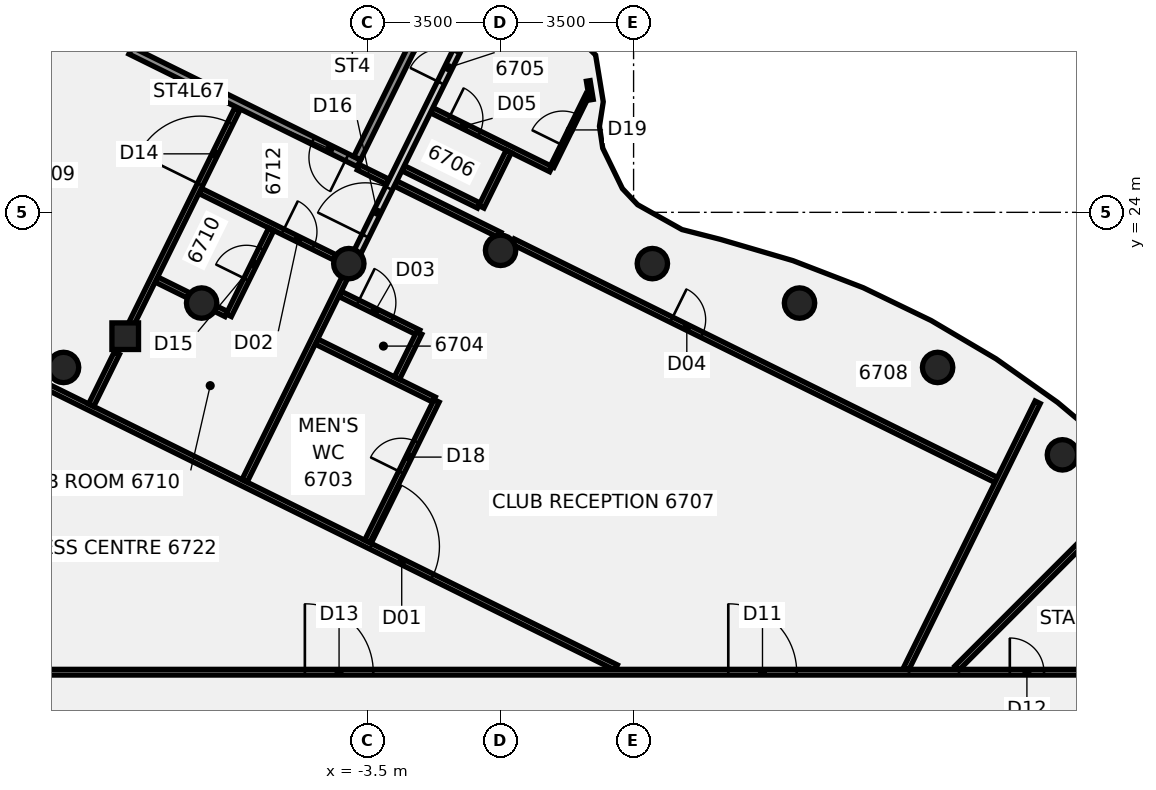
"""IFC4 building model, lengths in metres.
Left out: names, types, materials, properties, quantities, classifications, styles, units other than length and angle.
Written with IfcOpenShell. Run it as: python <this file> out.ifc"""

import sys

from ifc_helpers import new_model, si_unit, direction, frame, frame_2d, origin, origin_2d, place, context, subcontext, project, spatial, rectangle, circle, extrude, element, fill, save


model = new_model("IFC4")
c1 = context("Model", 3, precision=1e-05, world=origin(), true_north=direction((0.0, 1.0)))
c2 = subcontext(c1, "Body", "Model", "MODEL_VIEW")
j1 = project(units=[si_unit("LENGTHUNIT", "METRE"), si_unit("PLANEANGLEUNIT", "RADIAN")], contexts=[c1])
p1 = place(None, origin())
s1 = spatial("IfcSite", under=j1, at=p1, CompositionType="ELEMENT")
p2 = place(p1, origin())
s2 = spatial("IfcBuilding", under=s1, at=p2, CompositionType="ELEMENT")
p3 = place(p2, frame((0.0, 0.0, 264.0)))
s3 = spatial("IfcBuildingStorey", under=s2, at=p3, CompositionType="ELEMENT", Elevation=264.0)
for number, where, z_axis, x_axis in (
    (1, (14.784, 17.619, -0.14), (0.0, 0.0, 1.0), (1.0, 0.0, 0.0)),
    (2, (11.5, 19.919, -0.14), (0.0, 0.0, 1.0), (1.0, 0.0, 0.0)),
    (3, (7.866, 21.613, -0.14), (0.0, 0.0, 1.0), (1.0, 0.0, 0.0)),
    (4, (3.994, 22.651, -0.14), (0.0, 0.0, 1.0), (1.0, 0.0, 0.0)),
    (5, (0.0, 23.0, -0.14), (0.0, 0.0, 1.0), (1.0, 0.0, 0.0)),
    (6, (-3.994, 22.651, -0.14), (0.0, 0.0, 1.0), (1.0, 0.0, 0.0)),
    (7, (-7.866, 21.613, -0.14), (0.0, 0.0, 1.0), (1.0, 0.0, 0.0)),
    (8, (-11.5, 19.919, -0.14), (0.0, 0.0, 1.0), (1.0, 0.0, 0.0)),
):
    element("IfcColumn", number, at=place(p3, frame(where, z_axis=z_axis, x_axis=x_axis)), inside=s3, PredefinedType="COLUMN", context=c2, shape_type="SweptSolid", body=[
        extrude(circle(Radius=0.4, at=origin_2d()), origin(), (0.0, 0.0, 1.0), 3.6),
    ])
p4 = place(p3, frame((-9.877, 20.741, -0.139), z_axis=(0.006777933843, -0.049953372425, 0.998728551808), x_axis=(0.44361754105, 0.895242437735, 0.041766672718)))
e9 = element("IfcColumn", 9, at=p4, inside=s3, PredefinedType="COLUMN", context=c2, shape_type="SweptSolid", body=[
    extrude(rectangle(XDim=0.7, YDim=0.7, at=origin_2d()), origin(), (0.0, 0.0, 1.0), 3.602),
])
p5 = place(p3, frame((-15.346, 21.099, 0.0), z_axis=(0.0, 0.0, 1.0), x_axis=(0.896736901725, -0.442564039529, 0.0)))
e10 = element("IfcWall", 10, at=p5, inside=s3, PredefinedType="PARTITIONING", context=c2, shape_type="SweptSolid", body=[
    extrude(rectangle(XDim=20.505, YDim=0.15, at=frame_2d((10.252, 0.0))), origin(), (0.0, 0.0, 1.0), 2.864),
])
p6 = place(p5, frame((13.313, 0.0, 0.0)))
e11 = element("IfcOpeningElement", 11, at=p6, cuts=e10, PredefinedType="OPENING", context=c2, shape_type="SweptSolid", body=[
    extrude(rectangle(XDim=1.8, YDim=2.1, at=frame_2d((0.9, 1.05))), frame((0.0, 0.085, 0.0), z_axis=(0.0, -1.0, 0.0), x_axis=(1.0, 0.0, 0.0)), (0.0, 0.0, 1.0), 0.17),
])
p7 = place(p3, frame((-9.058, 22.233, 0.0), z_axis=(0.0, 0.0, 1.0), x_axis=(0.896612194763, -0.442816634965, 0.0)))
e12 = element("IfcWall", 12, at=p7, inside=s3, PredefinedType="PARTITIONING", context=c2, shape_type="SweptSolid", body=[
    extrude(rectangle(XDim=0.934, YDim=0.15, at=frame_2d((0.467, 0.0))), origin(), (0.0, 0.0, 1.0), 2.864),
])
p8 = place(p3, frame((-7.497, 21.462, 0.0), z_axis=(0.0, 0.0, 1.0), x_axis=(0.896780848016, -0.442474983058, 0.0)))
e13 = element("IfcWall", 13, at=p8, inside=s3, PredefinedType="PARTITIONING", context=c2, shape_type="SweptSolid", body=[
    extrude(rectangle(XDim=0.31, YDim=0.15, at=frame_2d((0.155, 0.0))), origin(), (0.0, 0.0, 1.0), 2.864),
])
p9 = place(p3, frame((-7.907, 24.564, 0.0), z_axis=(0.0, 0.0, 1.0), x_axis=(0.896882946965, -0.442267995048, 0.0)))
e14 = element("IfcWall", 14, at=p9, inside=s3, PredefinedType="PARTITIONING", context=c2, shape_type="SweptSolid", body=[
    extrude(rectangle(XDim=3.955, YDim=0.15, at=frame_2d((1.977, 0.0))), origin(), (0.0, 0.0, 1.0), 2.864),
])
p10 = place(p9, frame((2.425, 0.0, 0.0)))
e15 = element("IfcOpeningElement", 15, at=p10, cuts=e14, PredefinedType="OPENING", context=c2, shape_type="SweptSolid", body=[
    extrude(rectangle(XDim=0.9, YDim=2.1, at=frame_2d((0.45, 1.05))), frame((0.0, 0.085, 0.0), z_axis=(0.0, -1.0, 0.0), x_axis=(1.0, 0.0, 0.0)), (0.0, 0.0, 1.0), 0.17),
])
p11 = place(p3, frame((-4.845, 20.6, 0.0), z_axis=(0.0, 0.0, 1.0), x_axis=(0.896750466417, -0.442536553272, 0.0)))
e16 = element("IfcWall", 16, at=p11, inside=s3, PredefinedType="PARTITIONING", context=c2, shape_type="SweptSolid", body=[
    extrude(rectangle(XDim=3.45, YDim=0.15, at=frame_2d((1.725, 0.0))), origin(), (0.0, 0.0, 1.0), 2.864),
])
p12 = place(p3, frame((-4.221, 21.853, 0.0), z_axis=(0.0, 0.0, 1.0), x_axis=(0.896771622249, -0.442493680778, 0.0)))
e17 = element("IfcWall", 17, at=p12, inside=s3, PredefinedType="PARTITIONING", context=c2, shape_type="SweptSolid", body=[
    extrude(rectangle(XDim=2.3, YDim=0.15, at=frame_2d((1.15, 0.0))), origin(), (0.0, 0.0, 1.0), 2.864),
])
p13 = place(p12, frame((0.52, 0.0, 0.0)))
e18 = element("IfcOpeningElement", 18, at=p13, cuts=e17, PredefinedType="OPENING", context=c2, shape_type="SweptSolid", body=[
    extrude(rectangle(XDim=1.0, YDim=2.1, at=frame_2d((0.5, 1.05))), frame((0.0, 0.085, 0.0), z_axis=(0.0, -1.0, 0.0), x_axis=(1.0, 0.0, 0.0)), (0.0, 0.0, 1.0), 0.17),
])
p14 = place(p3, frame((-3.738, 25.183, 0.0), z_axis=(0.0, 0.0, 1.0), x_axis=(0.896799875453, -0.442436417339, 0.0)))
e19 = element("IfcWall", 19, at=p14, inside=s3, PredefinedType="PARTITIONING", context=c2, shape_type="SweptSolid", body=[
    extrude(rectangle(XDim=0.86, YDim=0.15, at=frame_2d((0.43, 0.0))), origin(), (0.0, 0.0, 1.0), 2.864),
])
p15 = place(p3, frame((-2.764, 24.759, 0.0), z_axis=(0.0, 0.0, 1.0), x_axis=(0.896729050062, -0.442579948456, 0.0)))
e20 = element("IfcWall", 20, at=p15, inside=s3, PredefinedType="PARTITIONING", context=c2, shape_type="SweptSolid", body=[
    extrude(rectangle(XDim=3.06, YDim=0.15, at=frame_2d((1.53, 0.0))), origin(), (0.0, 0.0, 1.0), 2.864),
])
p16 = place(p3, frame((0.327, 23.233, 0.0), z_axis=(0.0, 0.0, 1.0), x_axis=(0.896732994019, -0.442571957355, 0.0)))
e21 = element("IfcWall", 21, at=p16, inside=s3, PredefinedType="PARTITIONING", context=c2, shape_type="SweptSolid", body=[
    extrude(rectangle(XDim=14.178, YDim=0.15, at=frame_2d((7.089, 0.0))), origin(), (0.0, 0.0, 1.0), 2.864),
])
p17 = place(p16, frame((4.65, 0.0, 0.0)))
e22 = element("IfcOpeningElement", 22, at=p17, cuts=e21, PredefinedType="OPENING", context=c2, shape_type="SweptSolid", body=[
    extrude(rectangle(XDim=0.9, YDim=2.1, at=frame_2d((0.45, 1.05))), frame((0.0, 0.085, 0.0), z_axis=(0.0, -1.0, 0.0), x_axis=(1.0, 0.0, 0.0)), (0.0, 0.0, 1.0), 0.17),
])
p18 = place(p3, frame((-2.565, 25.162, 0.0), z_axis=(0.0, 0.0, 1.0), x_axis=(0.896768640795, -0.442499723037, 0.0)))
e23 = element("IfcWall", 23, at=p18, inside=s3, PredefinedType="PARTITIONING", context=c2, shape_type="SweptSolid", body=[
    extrude(rectangle(XDim=2.22, YDim=0.15, at=frame_2d((1.11, 0.0))), origin(), (0.0, 0.0, 1.0), 2.864),
])
p19 = place(p3, frame((-1.809, 26.685, 0.0), z_axis=(0.0, 0.0, 1.0), x_axis=(0.896582193995, -0.44287737514, 0.0)))
e24 = element("IfcWall", 24, at=p19, inside=s3, PredefinedType="PARTITIONING", context=c2, shape_type="SweptSolid", body=[
    extrude(rectangle(XDim=3.495, YDim=0.15, at=frame_2d((1.748, 0.0))), origin(), (0.0, 0.0, 1.0), 2.864),
])
p20 = place(p19, frame((0.495, 0.0, 0.0)))
e25 = element("IfcOpeningElement", 25, at=p20, cuts=e24, PredefinedType="OPENING", context=c2, shape_type="SweptSolid", body=[
    extrude(rectangle(XDim=0.9, YDim=2.1, at=frame_2d((0.45, 1.05))), frame((0.0, 0.085, 0.0), z_axis=(0.0, -1.0, 0.0), x_axis=(1.0, 0.0, 0.0)), (0.0, 0.0, 1.0), 0.17),
])
p21 = place(p3, frame((-17.065, 11.9, 0.0), z_axis=(0.0, 0.0, 1.0), x_axis=(1.0, 0.0, 0.0)))
e26 = element("IfcWall", 26, at=p21, inside=s3, PredefinedType="PARTITIONING", context=c2, shape_type="SweptSolid", body=[
    extrude(rectangle(XDim=34.165, YDim=0.15, at=frame_2d((17.083, 0.0))), origin(), (0.0, 0.0, 1.0), 2.864),
])
p22 = place(p21, frame((23.057, 0.0, 0.0)))
e27 = element("IfcOpeningElement", 27, at=p22, cuts=e26, PredefinedType="OPENING", context=c2, shape_type="SweptSolid", body=[
    extrude(rectangle(XDim=1.8, YDim=2.1, at=frame_2d((0.9, 1.05))), frame((0.0, 0.085, 0.0), z_axis=(0.0, -1.0, 0.0), x_axis=(1.0, 0.0, 0.0)), (0.0, 0.0, 1.0), 0.17),
])
p23 = place(p21, frame((30.465, 0.0, 0.0)))
e28 = element("IfcOpeningElement", 28, at=p23, cuts=e26, PredefinedType="OPENING", context=c2, shape_type="SweptSolid", body=[
    extrude(rectangle(XDim=0.9, YDim=2.1, at=frame_2d((0.45, 1.05))), frame((0.0, 0.085, 0.0), z_axis=(0.0, -1.0, 0.0), x_axis=(1.0, 0.0, 0.0)), (0.0, 0.0, 1.0), 0.17),
])
p24 = place(p21, frame((11.915, 0.0, 0.0)))
e29 = element("IfcOpeningElement", 29, at=p24, cuts=e26, PredefinedType="OPENING", context=c2, shape_type="SweptSolid", body=[
    extrude(rectangle(XDim=1.8, YDim=2.1, at=frame_2d((0.9, 1.05))), frame((0.0, 0.085, 0.0), z_axis=(0.0, -1.0, 0.0), x_axis=(1.0, 0.0, 0.0)), (0.0, 0.0, 1.0), 0.17),
])
p25 = place(p3, frame((12.01, 12.01, 0.0), z_axis=(0.0, 0.0, 1.0), x_axis=(0.707106781187, 0.707106781187, 0.0)))
e30 = element("IfcWall", 30, at=p25, inside=s3, PredefinedType="PARTITIONING", context=c2, shape_type="SweptSolid", body=[
    extrude(rectangle(XDim=6.691, YDim=0.15, at=frame_2d((3.345, 0.0))), origin(), (0.0, 0.0, 1.0), 2.864),
])
p26 = place(p3, frame((-10.773, 18.925, 0.0), z_axis=(0.0, 0.0, 1.0), x_axis=(0.44235057228, 0.896842222023, 0.0)))
e31 = element("IfcWall", 31, at=p26, inside=s3, PredefinedType="PARTITIONING", context=c2, shape_type="SweptSolid", body=[
    extrude(rectangle(XDim=1.528, YDim=0.15, at=frame_2d((0.764, 0.0))), origin(), (0.0, 0.0, 1.0), 2.864),
])
p27 = place(p3, frame((-9.728, 21.044, 0.0), z_axis=(0.0, 0.0, 1.0), x_axis=(0.442372056377, 0.896831625076, 0.0)))
e32 = element("IfcWall", 32, at=p27, inside=s3, PredefinedType="PARTITIONING", context=c2, shape_type="SweptSolid", body=[
    extrude(rectangle(XDim=6.322, YDim=0.15, at=frame_2d((3.161, 0.0))), origin(), (0.0, 0.0, 1.0), 2.864),
])
p28 = place(p27, frame((4.112, 0.0, 0.0)))
e33 = element("IfcOpeningElement", 33, at=p28, cuts=e32, PredefinedType="OPENING", context=c2, shape_type="SweptSolid", body=[
    extrude(rectangle(XDim=1.8, YDim=2.1, at=frame_2d((0.9, 1.05))), frame((0.0, 0.085, 0.0), z_axis=(0.0, -1.0, 0.0), x_axis=(1.0, 0.0, 0.0)), (0.0, 0.0, 1.0), 0.17),
])
p29 = place(p3, frame((-7.152, 21.292, 0.0), z_axis=(0.0, 0.0, 1.0), x_axis=(0.442645023645, 0.896696929315, 0.0)))
e34 = element("IfcWall", 34, at=p29, inside=s3, PredefinedType="PARTITIONING", context=c2, shape_type="SweptSolid", body=[
    extrude(rectangle(XDim=2.526, YDim=0.15, at=frame_2d((1.263, 0.0))), origin(), (0.0, 0.0, 1.0), 2.864),
])
p30 = place(p29, frame((1.05, 0.0, 0.0)))
e35 = element("IfcOpeningElement", 35, at=p30, cuts=e34, PredefinedType="OPENING", context=c2, shape_type="SweptSolid", body=[
    extrude(rectangle(XDim=0.9, YDim=2.1, at=frame_2d((0.45, 1.05))), frame((0.0, 0.085, 0.0), z_axis=(0.0, -1.0, 0.0), x_axis=(1.0, 0.0, 0.0)), (0.0, 0.0, 1.0), 0.17),
])
p31 = place(p3, frame((-6.736, 16.938, 0.0), z_axis=(0.0, 0.0, 1.0), x_axis=(0.442543279476, 0.896747147077, 0.0)))
e36 = element("IfcWall", 36, at=p31, inside=s3, PredefinedType="PARTITIONING", context=c2, shape_type="SweptSolid", body=[
    extrude(rectangle(XDim=6.114, YDim=0.15, at=frame_2d((3.057, 0.0))), origin(), (0.0, 0.0, 1.0), 2.864),
])
p32 = place(p3, frame((-3.831, 22.823, 0.0), z_axis=(0.0, 0.0, 1.0), x_axis=(0.442502887837, 0.896767079155, 0.0)))
e37 = element("IfcWall", 37, at=p32, inside=s3, PredefinedType="PARTITIONING", context=c2, shape_type="SweptSolid", body=[
    extrude(rectangle(XDim=7.556, YDim=0.2, at=frame_2d((3.778, 0.0))), origin(), (0.0, 0.0, 1.0), 2.864),
])
p33 = place(p32, frame((0.617, 0.0, 0.0)))
e38 = element("IfcOpeningElement", 38, at=p33, cuts=e37, PredefinedType="OPENING", context=c2, shape_type="SweptSolid", body=[
    extrude(rectangle(XDim=1.4, YDim=2.1, at=frame_2d((0.7, 1.05))), frame((0.0, 0.11, 0.0), z_axis=(0.0, -1.0, 0.0), x_axis=(1.0, 0.0, 0.0)), (0.0, 0.0, 1.0), 0.22),
])
p34 = place(p32, frame((5.107, 0.0, 0.0)))
e39 = element("IfcOpeningElement", 39, at=p34, cuts=e37, PredefinedType="OPENING", context=c2, shape_type="SweptSolid", body=[
    extrude(rectangle(XDim=0.9, YDim=2.1, at=frame_2d((0.45, 1.05))), frame((0.0, 0.11, 0.0), z_axis=(0.0, -1.0, 0.0), x_axis=(1.0, 0.0, 0.0)), (0.0, 0.0, 1.0), 0.22),
])
p35 = place(p3, frame((-3.508, 15.345, 0.0), z_axis=(0.0, 0.0, 1.0), x_axis=(0.442515086805, 0.896761059564, 0.0)))
e40 = element("IfcWall", 40, at=p35, inside=s3, PredefinedType="PARTITIONING", context=c2, shape_type="SweptSolid", body=[
    extrude(rectangle(XDim=4.121, YDim=0.15, at=frame_2d((2.061, 0.0))), origin(), (0.0, 0.0, 1.0), 2.864),
])
p36 = place(p35, frame((2.02, 0.0, 0.0)))
e41 = element("IfcOpeningElement", 41, at=p36, cuts=e40, PredefinedType="OPENING", context=c2, shape_type="SweptSolid", body=[
    extrude(rectangle(XDim=0.9, YDim=2.1, at=frame_2d((0.45, 1.05))), frame((0.0, 0.085, 0.0), z_axis=(0.0, -1.0, 0.0), x_axis=(1.0, 0.0, 0.0)), (0.0, 0.0, 1.0), 0.17),
])
p37 = place(p3, frame((1.358, 25.204, 0.0), z_axis=(0.0, 0.0, 1.0), x_axis=(0.442491171614, 0.896772860341, 0.0)))
e42 = element("IfcWall", 42, at=p37, inside=s3, PredefinedType="PARTITIONING", context=c2, shape_type="SweptSolid", body=[
    extrude(rectangle(XDim=2.112, YDim=0.1, at=frame_2d((1.056, 0.0))), origin(), (0.0, 0.0, 1.0), 2.864),
])
p38 = place(p37, frame((0.625, 0.0, 0.0)))
e43 = element("IfcOpeningElement", 43, at=p38, cuts=e42, PredefinedType="OPENING", context=c2, shape_type="SweptSolid", body=[
    extrude(rectangle(XDim=0.9, YDim=2.1, at=frame_2d((0.45, 1.05))), frame((0.0, 0.06, 0.0), z_axis=(0.0, -1.0, 0.0), x_axis=(1.0, 0.0, 0.0)), (0.0, 0.0, 1.0), 0.12),
])
p39 = place(p3, frame((-2.727, 19.638, 0.0), z_axis=(0.0, 0.0, 1.0), x_axis=(0.442266076038, 0.896883893258, 0.0)))
e44 = element("IfcWall", 44, at=p39, inside=s3, PredefinedType="PARTITIONING", context=c2, shape_type="SweptSolid", body=[
    extrude(rectangle(XDim=1.324, YDim=0.15, at=frame_2d((0.662, 0.0))), origin(), (0.0, 0.0, 1.0), 2.864),
])
p40 = place(p3, frame((-0.504, 24.145, 0.0), z_axis=(0.0, 0.0, 1.0), x_axis=(0.442337199673, 0.896848817686, 0.0)))
e45 = element("IfcWall", 45, at=p40, inside=s3, PredefinedType="PARTITIONING", context=c2, shape_type="SweptSolid", body=[
    extrude(rectangle(XDim=1.624, YDim=0.15, at=frame_2d((0.812, 0.0))), origin(), (0.0, 0.0, 1.0), 2.864),
])
p41 = place(p3, frame((10.672, 11.99, 0.0), z_axis=(0.0, 0.0, 1.0), x_axis=(0.442549118131, 0.896744265686, 0.0)))
e46 = element("IfcWall", 46, at=p41, inside=s3, PredefinedType="PARTITIONING", context=c2, shape_type="SweptSolid", body=[
    extrude(rectangle(XDim=7.819, YDim=0.15, at=frame_2d((3.91, 0.0))), origin(), (0.0, 0.0, 1.0), 2.864),
])
p42 = place(p3, frame((2.388, 26.964, 0.0), z_axis=(0.0, 0.0, 1.0), x_axis=(-0.161151313498, 0.98692971085, 0.0)))
e47 = element("IfcWall", 47, at=p42, inside=s3, PredefinedType="PARTITIONING", context=c2, shape_type="SweptSolid", body=[
    extrude(rectangle(XDim=0.5, YDim=0.1, at=frame_2d((0.25, 0.0))), origin(), (0.0, 0.0, 1.0), 2.864),
])
p43 = place(p3, frame((-3.729, 25.29, -0.14), z_axis=(0.0, 0.0, 1.0), x_axis=(-0.896747082682, 0.442543409962, 0.0)))
e48 = element("IfcWall", 48, at=p43, inside=s3, PredefinedType="SHEAR", context=c2, shape_type="SweptSolid", body=[
    extrude(rectangle(XDim=6.7, YDim=0.2, at=frame_2d((3.35, 0.0))), origin(), (0.0, 0.0, 1.0), 3.154),
])
p44 = place(p43, frame((0.35, 0.0, 0.0)))
e49 = element("IfcOpeningElement", 49, at=p44, cuts=e48, PredefinedType="OPENING", context=c2, shape_type="SweptSolid", body=[
    extrude(rectangle(XDim=1.0, YDim=2.1, at=frame_2d((0.5, 1.05))), frame((0.0, 0.11, 0.0), z_axis=(0.0, -1.0, 0.0), x_axis=(1.0, 0.0, 0.0)), (0.0, 0.0, 1.0), 0.22),
])
p45 = place(p3, frame((-2.358, 28.293, -0.14), z_axis=(0.0, 0.0, 1.0), x_axis=(-0.442537962391, -0.89674977103, 0.0)))
e50 = element("IfcWall", 50, at=p45, inside=s3, PredefinedType="SHEAR", context=c2, shape_type="SweptSolid", body=[
    extrude(rectangle(XDim=3.2, YDim=0.2, at=frame_2d((1.6, 0.0))), origin(), (0.0, 0.0, 1.0), 3.6),
])
p46 = place(p6, origin())
e51 = element("IfcDoor", 51, at=p46, inside=s3, OperationType="DOUBLE_DOOR_SINGLE_SWING", PredefinedType="DOOR", context=c2, shape_type="SweptSolid", body=[
    extrude(rectangle(XDim=1.8, YDim=2.1, at=frame_2d((0.9, 1.05))), frame((0.0, 0.025, 0.0), z_axis=(0.0, -1.0, 0.0), x_axis=(1.0, 0.0, 0.0)), (0.0, 0.0, 1.0), 0.05),
])
fill(e11, e51)
p47 = place(p10, frame((0.9, 0.0, 0.0), z_axis=(0.0, 0.0, 1.0), x_axis=(-1.0, 0.0, 0.0)))
e52 = element("IfcDoor", 52, at=p47, inside=s3, OperationType="SINGLE_SWING_RIGHT", PredefinedType="DOOR", context=c2, shape_type="SweptSolid", body=[
    extrude(rectangle(XDim=0.9, YDim=2.1, at=frame_2d((0.45, 1.05))), frame((0.0, 0.025, 0.0), z_axis=(0.0, -1.0, 0.0), x_axis=(1.0, 0.0, 0.0)), (0.0, 0.0, 1.0), 0.05),
])
fill(e15, e52)
p48 = place(p13, frame((1.0, 0.0, 0.0), z_axis=(0.0, 0.0, 1.0), x_axis=(-1.0, 0.0, 0.0)))
e53 = element("IfcDoor", 53, at=p48, inside=s3, OperationType="SINGLE_SWING_LEFT", PredefinedType="DOOR", context=c2, shape_type="SweptSolid", body=[
    extrude(rectangle(XDim=1.0, YDim=2.1, at=frame_2d((0.5, 1.05))), frame((0.0, 0.025, 0.0), z_axis=(0.0, -1.0, 0.0), x_axis=(1.0, 0.0, 0.0)), (0.0, 0.0, 1.0), 0.05),
])
fill(e18, e53)
p49 = place(p17, origin())
e54 = element("IfcDoor", 54, at=p49, inside=s3, OperationType="SINGLE_SWING_RIGHT", PredefinedType="DOOR", context=c2, shape_type="SweptSolid", body=[
    extrude(rectangle(XDim=0.9, YDim=2.1, at=frame_2d((0.45, 1.05))), frame((0.0, 0.025, 0.0), z_axis=(0.0, -1.0, 0.0), x_axis=(1.0, 0.0, 0.0)), (0.0, 0.0, 1.0), 0.05),
])
fill(e22, e54)
p50 = place(p20, frame((0.9, 0.0, 0.0), z_axis=(0.0, 0.0, 1.0), x_axis=(-1.0, 0.0, 0.0)))
e55 = element("IfcDoor", 55, at=p50, inside=s3, OperationType="SINGLE_SWING_LEFT", PredefinedType="DOOR", context=c2, shape_type="SweptSolid", body=[
    extrude(rectangle(XDim=0.9, YDim=2.1, at=frame_2d((0.45, 1.05))), frame((0.0, 0.025, 0.0), z_axis=(0.0, -1.0, 0.0), x_axis=(1.0, 0.0, 0.0)), (0.0, 0.0, 1.0), 0.05),
])
fill(e25, e55)
p51 = place(p22, frame((1.8, 0.0, 0.0), z_axis=(0.0, 0.0, 1.0), x_axis=(-1.0, 0.0, 0.0)))
e56 = element("IfcDoor", 56, at=p51, inside=s3, OperationType="DOUBLE_DOOR_SINGLE_SWING", PredefinedType="DOOR", context=c2, shape_type="SweptSolid", body=[
    extrude(rectangle(XDim=1.8, YDim=2.1, at=frame_2d((0.9, 1.05))), frame((0.0, 0.025, 0.0), z_axis=(0.0, -1.0, 0.0), x_axis=(1.0, 0.0, 0.0)), (0.0, 0.0, 1.0), 0.05),
])
fill(e27, e56)
p52 = place(p23, origin())
e57 = element("IfcDoor", 57, at=p52, inside=s3, OperationType="SINGLE_SWING_LEFT", PredefinedType="DOOR", context=c2, shape_type="SweptSolid", body=[
    extrude(rectangle(XDim=0.9, YDim=2.1, at=frame_2d((0.45, 1.05))), frame((0.0, 0.025, 0.0), z_axis=(0.0, -1.0, 0.0), x_axis=(1.0, 0.0, 0.0)), (0.0, 0.0, 1.0), 0.05),
])
fill(e28, e57)
p53 = place(p24, frame((1.8, 0.0, 0.0), z_axis=(0.0, 0.0, 1.0), x_axis=(-1.0, 0.0, 0.0)))
e58 = element("IfcDoor", 58, at=p53, inside=s3, OperationType="DOUBLE_DOOR_SINGLE_SWING", PredefinedType="DOOR", context=c2, shape_type="SweptSolid", body=[
    extrude(rectangle(XDim=1.8, YDim=2.1, at=frame_2d((0.9, 1.05))), frame((0.0, 0.025, 0.0), z_axis=(0.0, -1.0, 0.0), x_axis=(1.0, 0.0, 0.0)), (0.0, 0.0, 1.0), 0.05),
])
fill(e29, e58)
p54 = place(p28, origin())
e59 = element("IfcDoor", 59, at=p54, inside=s3, OperationType="DOUBLE_DOOR_SINGLE_SWING", PredefinedType="DOOR", context=c2, shape_type="SweptSolid", body=[
    extrude(rectangle(XDim=1.8, YDim=2.1, at=frame_2d((0.9, 1.05))), frame((0.0, 0.025, 0.0), z_axis=(0.0, -1.0, 0.0), x_axis=(1.0, 0.0, 0.0)), (0.0, 0.0, 1.0), 0.05),
])
fill(e33, e59)
p55 = place(p30, origin())
e60 = element("IfcDoor", 60, at=p55, inside=s3, OperationType="SINGLE_SWING_LEFT", PredefinedType="DOOR", context=c2, shape_type="SweptSolid", body=[
    extrude(rectangle(XDim=0.9, YDim=2.1, at=frame_2d((0.45, 1.05))), frame((0.0, 0.025, 0.0), z_axis=(0.0, -1.0, 0.0), x_axis=(1.0, 0.0, 0.0)), (0.0, 0.0, 1.0), 0.05),
])
fill(e35, e60)
p56 = place(p33, frame((1.4, 0.0, 0.0), z_axis=(0.0, 0.0, 1.0), x_axis=(-1.0, 0.0, 0.0)))
e61 = element("IfcDoor", 61, at=p56, inside=s3, OperationType="DOUBLE_DOOR_SINGLE_SWING", PredefinedType="DOOR", context=c2, shape_type="SweptSolid", body=[
    extrude(rectangle(XDim=1.4, YDim=2.1, at=frame_2d((0.7, 1.05))), frame((0.0, 0.025, 0.0), z_axis=(0.0, -1.0, 0.0), x_axis=(1.0, 0.0, 0.0)), (0.0, 0.0, 1.0), 0.05),
])
fill(e38, e61)
p57 = place(p34, origin())
e62 = element("IfcDoor", 62, at=p57, inside=s3, OperationType="SINGLE_SWING_LEFT", PredefinedType="DOOR", context=c2, shape_type="SweptSolid", body=[
    extrude(rectangle(XDim=0.9, YDim=2.1, at=frame_2d((0.45, 1.05))), frame((0.0, 0.025, 0.0), z_axis=(0.0, -1.0, 0.0), x_axis=(1.0, 0.0, 0.0)), (0.0, 0.0, 1.0), 0.05),
])
fill(e39, e62)
p58 = place(p36, origin())
e63 = element("IfcDoor", 63, at=p58, inside=s3, OperationType="SINGLE_SWING_LEFT", PredefinedType="DOOR", context=c2, shape_type="SweptSolid", body=[
    extrude(rectangle(XDim=0.9, YDim=2.1, at=frame_2d((0.45, 1.05))), frame((0.0, 0.025, 0.0), z_axis=(0.0, -1.0, 0.0), x_axis=(1.0, 0.0, 0.0)), (0.0, 0.0, 1.0), 0.05),
])
fill(e41, e63)
p59 = place(p38, origin())
e64 = element("IfcDoor", 64, at=p59, inside=s3, OperationType="SINGLE_SWING_LEFT", PredefinedType="DOOR", context=c2, shape_type="SweptSolid", body=[
    extrude(rectangle(XDim=0.9, YDim=2.1, at=frame_2d((0.45, 1.05))), frame((0.0, 0.025, 0.0), z_axis=(0.0, -1.0, 0.0), x_axis=(1.0, 0.0, 0.0)), (0.0, 0.0, 1.0), 0.05),
])
fill(e43, e64)
p60 = place(p44, origin())
e65 = element("IfcDoor", 65, at=p60, inside=s3, OperationType="SINGLE_SWING_LEFT", PredefinedType="DOOR", context=c2, shape_type="SweptSolid", body=[
    extrude(rectangle(XDim=1.0, YDim=2.1, at=frame_2d((0.5, 1.05))), frame((0.0, 0.025, 0.0), z_axis=(0.0, -1.0, 0.0), x_axis=(1.0, 0.0, 0.0)), (0.0, 0.0, 1.0), 0.05),
])
fill(e49, e65)
save(model, sys.argv[1])
